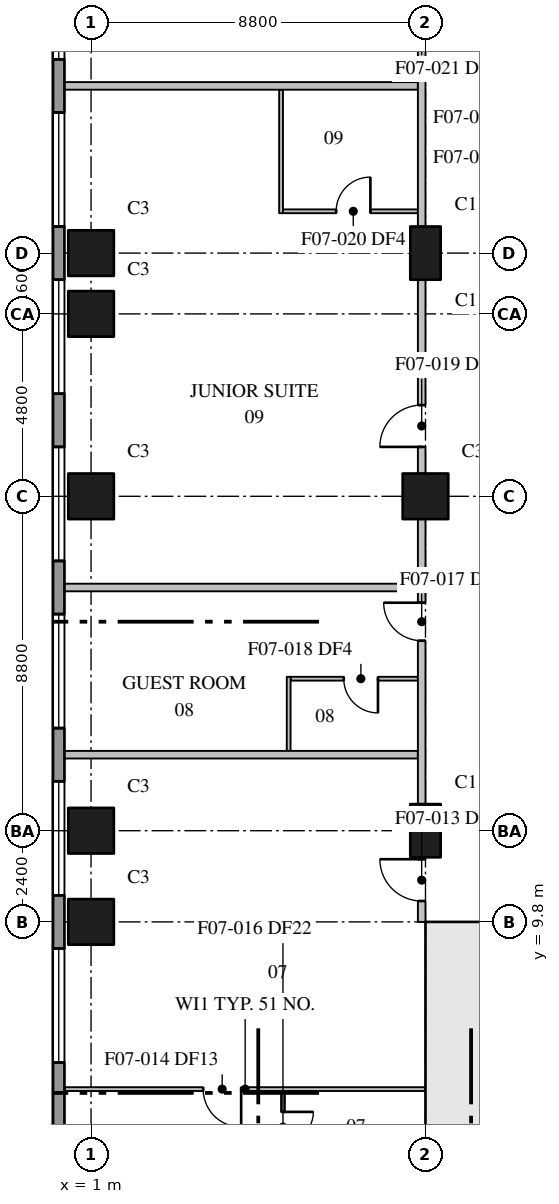
"""IFC4 building model, lengths in metres.
Left out: names, types, materials, properties, quantities, classifications, styles, units other than length and angle.
Written with IfcOpenShell. Run it as: python <this file> out.ifc"""

import sys

from ifc_helpers import new_model, si_unit, direction, frame, frame_2d, origin, origin_2d, place, context, subcontext, project, spatial, rectangle, extrude, element, fill, save


model = new_model("IFC4")
c1 = context("Model", 3, precision=1e-05, world=origin(), true_north=direction((0.0, 1.0)))
c2 = subcontext(c1, "Body", "Model", "MODEL_VIEW")
j1 = project(units=[si_unit("LENGTHUNIT", "METRE"), si_unit("PLANEANGLEUNIT", "RADIAN")], contexts=[c1])
p1 = place(None, origin())
s1 = spatial("IfcSite", under=j1, at=p1, CompositionType="ELEMENT")
p2 = place(p1, origin())
s2 = spatial("IfcBuilding", under=s1, at=p2, CompositionType="ELEMENT")
p3 = place(p2, frame((0.0, 0.0, 87.1)))
s3 = spatial("IfcBuildingStorey", under=s2, at=p3, CompositionType="ELEMENT", Elevation=87.1)
for number, where, z_axis, x_axis in (
    (1, (1.0, 9.8, 0.0), (0.0, 0.0, 1.0), (1.0, 0.0, 0.0)),
    (2, (1.0, 12.2, 0.0), (0.0, 0.0, 1.0), (1.0, 0.0, 0.0)),
    (3, (1.0, 21.0, 0.0), (0.0, 0.0, 1.0), (1.0, 0.0, 0.0)),
    (4, (1.0, 25.8, 0.0), (0.0, 0.0, 1.0), (1.0, 0.0, 0.0)),
    (5, (1.0, 27.4, 0.0), (0.0, 0.0, 1.0), (1.0, 0.0, 0.0)),
):
    element("IfcColumn", number, at=place(p3, frame(where, z_axis=z_axis, x_axis=x_axis)), inside=s3, PredefinedType="COLUMN", context=c2, shape_type="SweptSolid", body=[
        extrude(rectangle(XDim=1.2, YDim=1.2, at=origin_2d()), origin(), (0.0, 0.0, 1.0), 3.7),
    ])
p4 = place(p3, frame((9.8, 12.2, 0.0), z_axis=(0.0, 0.0, 1.0), x_axis=(0.0, 1.0, 0.0)))
e6 = element("IfcColumn", 6, at=p4, inside=s3, PredefinedType="COLUMN", context=c2, shape_type="SweptSolid", body=[
    extrude(rectangle(XDim=1.4, YDim=0.8, at=origin_2d()), origin(), (0.0, 0.0, 1.0), 3.7),
])
p5 = place(p3, frame((9.8, 21.0, 0.0), z_axis=(0.0, 0.0, 1.0), x_axis=(1.0, 0.0, 0.0)))
e7 = element("IfcColumn", 7, at=p5, inside=s3, PredefinedType="COLUMN", context=c2, shape_type="SweptSolid", body=[
    extrude(rectangle(XDim=1.2, YDim=1.2, at=origin_2d()), origin(), (0.0, 0.0, 1.0), 3.7),
])
p6 = place(p3, frame((9.8, 27.4, 0.0), z_axis=(0.0, 0.0, 1.0), x_axis=(0.0, 1.0, 0.0)))
e8 = element("IfcColumn", 8, at=p6, inside=s3, PredefinedType="COLUMN", context=c2, shape_type="SweptSolid", body=[
    extrude(rectangle(XDim=1.4, YDim=0.8, at=origin_2d()), origin(), (0.0, 0.0, 1.0), 3.7),
])
p7 = place(p3, frame((10.6, 1.2, 0.0), z_axis=(0.0, 0.0, 1.0), x_axis=(0.0, 1.0, 0.0)))
e9 = element("IfcWall", 9, at=p7, inside=s3, PredefinedType="SHEAR", context=c2, shape_type="SweptSolid", body=[
    extrude(rectangle(XDim=8.6, YDim=0.8, at=frame_2d((4.3, 0.0))), origin(), (0.0, 0.0, 1.0), 3.7),
])
p8 = place(p3, frame((9.8, 9.6, 0.0), z_axis=(0.0, 0.0, 1.0), x_axis=(1.0, 0.0, 0.0)))
e10 = element("IfcWall", 10, at=p8, inside=s3, PredefinedType="SHEAR", context=c2, shape_type="SweptSolid", body=[
    extrude(rectangle(XDim=4.3, YDim=0.4, at=frame_2d((2.15, 0.0))), origin(), (0.0, 0.0, 1.0), 3.7),
])
p9 = place(p8, frame((2.05, 0.0, 0.0)))
e11 = element("IfcOpeningElement", 11, at=p9, cuts=e10, PredefinedType="OPENING", context=c2, shape_type="SweptSolid", body=[
    extrude(rectangle(XDim=1.2, YDim=2.1, at=frame_2d((0.6, 1.05))), frame((0.0, 0.21, 0.0), z_axis=(0.0, -1.0, 0.0), x_axis=(1.0, 0.0, 0.0)), (0.0, 0.0, 1.0), 0.42),
])
p10 = place(p3, frame((0.15, 78.7, 0.0), z_axis=(0.0, 0.0, 1.0), x_axis=(0.0, -1.0, 0.0)))
e12 = element("IfcWall", 12, at=p10, inside=s3, PredefinedType="STANDARD", context=c2, shape_type="SweptSolid", body=[
    extrude(rectangle(XDim=76.5, YDim=0.3, at=frame_2d((38.25, 0.0))), origin(), (0.0, 0.0, 1.0), 3.4),
])
p11 = place(p10, frame((3.6, 0.0, 0.75)))
e13 = element("IfcOpeningElement", 13, at=p11, cuts=e12, PredefinedType="OPENING", context=c2, shape_type="SweptSolid", body=[
    extrude(rectangle(XDim=3.0, YDim=2.3, at=frame_2d((1.5, 1.15))), frame((0.0, 0.16, 0.0), z_axis=(0.0, -1.0, 0.0), x_axis=(1.0, 0.0, 0.0)), (0.0, 0.0, 1.0), 0.32),
])
p12 = place(p10, frame((8.0, 0.0, 0.75)))
e14 = element("IfcOpeningElement", 14, at=p12, cuts=e12, PredefinedType="OPENING", context=c2, shape_type="SweptSolid", body=[
    extrude(rectangle(XDim=3.0, YDim=2.3, at=frame_2d((1.5, 1.15))), frame((0.0, 0.16, 0.0), z_axis=(0.0, -1.0, 0.0), x_axis=(1.0, 0.0, 0.0)), (0.0, 0.0, 1.0), 0.32),
])
p13 = place(p10, frame((12.4, 0.0, 0.75)))
e15 = element("IfcOpeningElement", 15, at=p13, cuts=e12, PredefinedType="OPENING", context=c2, shape_type="SweptSolid", body=[
    extrude(rectangle(XDim=3.0, YDim=2.3, at=frame_2d((1.5, 1.15))), frame((0.0, 0.16, 0.0), z_axis=(0.0, -1.0, 0.0), x_axis=(1.0, 0.0, 0.0)), (0.0, 0.0, 1.0), 0.32),
])
p14 = place(p10, frame((16.8, 0.0, 0.75)))
e16 = element("IfcOpeningElement", 16, at=p14, cuts=e12, PredefinedType="OPENING", context=c2, shape_type="SweptSolid", body=[
    extrude(rectangle(XDim=3.0, YDim=2.3, at=frame_2d((1.5, 1.15))), frame((0.0, 0.16, 0.0), z_axis=(0.0, -1.0, 0.0), x_axis=(1.0, 0.0, 0.0)), (0.0, 0.0, 1.0), 0.32),
])
p15 = place(p10, frame((21.2, 0.0, 0.75)))
e17 = element("IfcOpeningElement", 17, at=p15, cuts=e12, PredefinedType="OPENING", context=c2, shape_type="SweptSolid", body=[
    extrude(rectangle(XDim=3.0, YDim=2.3, at=frame_2d((1.5, 1.15))), frame((0.0, 0.16, 0.0), z_axis=(0.0, -1.0, 0.0), x_axis=(1.0, 0.0, 0.0)), (0.0, 0.0, 1.0), 0.32),
])
p16 = place(p10, frame((25.6, 0.0, 0.75)))
e18 = element("IfcOpeningElement", 18, at=p16, cuts=e12, PredefinedType="OPENING", context=c2, shape_type="SweptSolid", body=[
    extrude(rectangle(XDim=3.0, YDim=2.3, at=frame_2d((1.5, 1.15))), frame((0.0, 0.16, 0.0), z_axis=(0.0, -1.0, 0.0), x_axis=(1.0, 0.0, 0.0)), (0.0, 0.0, 1.0), 0.32),
])
p17 = place(p10, frame((30.0, 0.0, 0.75)))
e19 = element("IfcOpeningElement", 19, at=p17, cuts=e12, PredefinedType="OPENING", context=c2, shape_type="SweptSolid", body=[
    extrude(rectangle(XDim=3.0, YDim=2.3, at=frame_2d((1.5, 1.15))), frame((0.0, 0.16, 0.0), z_axis=(0.0, -1.0, 0.0), x_axis=(1.0, 0.0, 0.0)), (0.0, 0.0, 1.0), 0.32),
])
p18 = place(p10, frame((34.4, 0.0, 0.75)))
e20 = element("IfcOpeningElement", 20, at=p18, cuts=e12, PredefinedType="OPENING", context=c2, shape_type="SweptSolid", body=[
    extrude(rectangle(XDim=3.0, YDim=2.3, at=frame_2d((1.5, 1.15))), frame((0.0, 0.16, 0.0), z_axis=(0.0, -1.0, 0.0), x_axis=(1.0, 0.0, 0.0)), (0.0, 0.0, 1.0), 0.32),
])
p19 = place(p10, frame((38.8, 0.0, 0.75)))
e21 = element("IfcOpeningElement", 21, at=p19, cuts=e12, PredefinedType="OPENING", context=c2, shape_type="SweptSolid", body=[
    extrude(rectangle(XDim=3.0, YDim=2.3, at=frame_2d((1.5, 1.15))), frame((0.0, 0.16, 0.0), z_axis=(0.0, -1.0, 0.0), x_axis=(1.0, 0.0, 0.0)), (0.0, 0.0, 1.0), 0.32),
])
p20 = place(p10, frame((43.2, 0.0, 0.75)))
e22 = element("IfcOpeningElement", 22, at=p20, cuts=e12, PredefinedType="OPENING", context=c2, shape_type="SweptSolid", body=[
    extrude(rectangle(XDim=3.0, YDim=2.3, at=frame_2d((1.5, 1.15))), frame((0.0, 0.16, 0.0), z_axis=(0.0, -1.0, 0.0), x_axis=(1.0, 0.0, 0.0)), (0.0, 0.0, 1.0), 0.32),
])
p21 = place(p10, frame((47.6, 0.0, 0.75)))
e23 = element("IfcOpeningElement", 23, at=p21, cuts=e12, PredefinedType="OPENING", context=c2, shape_type="SweptSolid", body=[
    extrude(rectangle(XDim=3.0, YDim=2.3, at=frame_2d((1.5, 1.15))), frame((0.0, 0.16, 0.0), z_axis=(0.0, -1.0, 0.0), x_axis=(1.0, 0.0, 0.0)), (0.0, 0.0, 1.0), 0.32),
])
p22 = place(p10, frame((52.0, 0.0, 0.75)))
e24 = element("IfcOpeningElement", 24, at=p22, cuts=e12, PredefinedType="OPENING", context=c2, shape_type="SweptSolid", body=[
    extrude(rectangle(XDim=3.0, YDim=2.3, at=frame_2d((1.5, 1.15))), frame((0.0, 0.16, 0.0), z_axis=(0.0, -1.0, 0.0), x_axis=(1.0, 0.0, 0.0)), (0.0, 0.0, 1.0), 0.32),
])
p23 = place(p10, frame((56.4, 0.0, 0.75)))
e25 = element("IfcOpeningElement", 25, at=p23, cuts=e12, PredefinedType="OPENING", context=c2, shape_type="SweptSolid", body=[
    extrude(rectangle(XDim=3.0, YDim=2.3, at=frame_2d((1.5, 1.15))), frame((0.0, 0.16, 0.0), z_axis=(0.0, -1.0, 0.0), x_axis=(1.0, 0.0, 0.0)), (0.0, 0.0, 1.0), 0.32),
])
p24 = place(p10, frame((60.8, 0.0, 0.75)))
e26 = element("IfcOpeningElement", 26, at=p24, cuts=e12, PredefinedType="OPENING", context=c2, shape_type="SweptSolid", body=[
    extrude(rectangle(XDim=3.0, YDim=2.3, at=frame_2d((1.5, 1.15))), frame((0.0, 0.16, 0.0), z_axis=(0.0, -1.0, 0.0), x_axis=(1.0, 0.0, 0.0)), (0.0, 0.0, 1.0), 0.32),
])
p25 = place(p10, frame((65.2, 0.0, 0.75)))
e27 = element("IfcOpeningElement", 27, at=p25, cuts=e12, PredefinedType="OPENING", context=c2, shape_type="SweptSolid", body=[
    extrude(rectangle(XDim=3.0, YDim=2.3, at=frame_2d((1.5, 1.15))), frame((0.0, 0.16, 0.0), z_axis=(0.0, -1.0, 0.0), x_axis=(1.0, 0.0, 0.0)), (0.0, 0.0, 1.0), 0.32),
])
p26 = place(p10, frame((69.6, 0.0, 0.75)))
e28 = element("IfcOpeningElement", 28, at=p26, cuts=e12, PredefinedType="OPENING", context=c2, shape_type="SweptSolid", body=[
    extrude(rectangle(XDim=3.0, YDim=2.3, at=frame_2d((1.5, 1.15))), frame((0.0, 0.16, 0.0), z_axis=(0.0, -1.0, 0.0), x_axis=(1.0, 0.0, 0.0)), (0.0, 0.0, 1.0), 0.32),
])
p27 = place(p3, frame((9.7, 9.8, 0.0), z_axis=(0.0, 0.0, 1.0), x_axis=(0.0, 1.0, 0.0)))
e29 = element("IfcWall", 29, at=p27, inside=s3, PredefinedType="PARTITIONING", context=c2, shape_type="SweptSolid", body=[
    extrude(rectangle(XDim=1.7, YDim=0.2, at=frame_2d((0.85, 0.0))), origin(), (0.0, 0.0, 1.0), 3.4),
])
p28 = place(p27, frame((0.55, 0.0, 0.0)))
e30 = element("IfcOpeningElement", 30, at=p28, cuts=e29, PredefinedType="OPENING", context=c2, shape_type="SweptSolid", body=[
    extrude(rectangle(XDim=1.1, YDim=2.1, at=frame_2d((0.55, 1.05))), frame((0.0, 0.11, 0.0), z_axis=(0.0, -1.0, 0.0), x_axis=(1.0, 0.0, 0.0)), (0.0, 0.0, 1.0), 0.22),
])
p29 = place(p3, frame((9.7, 12.9, 0.0), z_axis=(0.0, 0.0, 1.0), x_axis=(0.0, 1.0, 0.0)))
e31 = element("IfcWall", 31, at=p29, inside=s3, PredefinedType="PARTITIONING", context=c2, shape_type="SweptSolid", body=[
    extrude(rectangle(XDim=7.5, YDim=0.2, at=frame_2d((3.75, 0.0))), origin(), (0.0, 0.0, 1.0), 3.4),
])
p30 = place(p29, frame((4.3, 0.0, 0.0)))
e32 = element("IfcOpeningElement", 32, at=p30, cuts=e31, PredefinedType="OPENING", context=c2, shape_type="SweptSolid", body=[
    extrude(rectangle(XDim=1.0, YDim=2.1, at=frame_2d((0.5, 1.05))), frame((0.0, 0.11, 0.0), z_axis=(0.0, -1.0, 0.0), x_axis=(1.0, 0.0, 0.0)), (0.0, 0.0, 1.0), 0.22),
])
p31 = place(p3, frame((9.7, 21.6, 0.0), z_axis=(0.0, 0.0, 1.0), x_axis=(0.0, 1.0, 0.0)))
e33 = element("IfcWall", 33, at=p31, inside=s3, PredefinedType="PARTITIONING", context=c2, shape_type="SweptSolid", body=[
    extrude(rectangle(XDim=5.1, YDim=0.2, at=frame_2d((2.55, 0.0))), origin(), (0.0, 0.0, 1.0), 3.4),
])
p32 = place(p31, frame((0.7, 0.0, 0.0)))
e34 = element("IfcOpeningElement", 34, at=p32, cuts=e33, PredefinedType="OPENING", context=c2, shape_type="SweptSolid", body=[
    extrude(rectangle(XDim=1.1, YDim=2.1, at=frame_2d((0.55, 1.05))), frame((0.0, 0.11, 0.0), z_axis=(0.0, -1.0, 0.0), x_axis=(1.0, 0.0, 0.0)), (0.0, 0.0, 1.0), 0.22),
])
p33 = place(p3, frame((9.7, 28.1, 0.0), z_axis=(0.0, 0.0, 1.0), x_axis=(0.0, 1.0, 0.0)))
e35 = element("IfcWall", 35, at=p33, inside=s3, PredefinedType="PARTITIONING", context=c2, shape_type="SweptSolid", body=[
    extrude(rectangle(XDim=7.4, YDim=0.2, at=frame_2d((3.7, 0.0))), origin(), (0.0, 0.0, 1.0), 3.4),
])
p34 = place(p33, frame((5.2, 0.0, 0.0)))
e36 = element("IfcOpeningElement", 36, at=p34, cuts=e35, PredefinedType="OPENING", context=c2, shape_type="SweptSolid", body=[
    extrude(rectangle(XDim=1.1, YDim=2.1, at=frame_2d((0.55, 1.05))), frame((0.0, 0.11, 0.0), z_axis=(0.0, -1.0, 0.0), x_axis=(1.0, 0.0, 0.0)), (0.0, 0.0, 1.0), 0.22),
])
for number, where, z_axis, x_axis in (
    (37, (0.31, 14.2, 0.0), (0.0, 0.0, 1.0), (1.0, 0.0, 0.0)),
    (38, (0.31, 18.6, 0.0), (0.0, 0.0, 1.0), (1.0, 0.0, 0.0)),
    (39, (0.31, 31.8, 0.0), (0.0, 0.0, 1.0), (1.0, 0.0, 0.0)),
):
    element("IfcWall", number, at=place(p3, frame(where, z_axis=z_axis, x_axis=x_axis)), inside=s3, PredefinedType="PARTITIONING", context=c2, shape_type="SweptSolid", body=[
        extrude(rectangle(XDim=9.29, YDim=0.2, at=frame_2d((4.645, 0.0))), origin(), (0.0, 0.0, 1.0), 3.4),
    ])
p35 = place(p3, frame((9.6, 16.2, 0.0), z_axis=(0.0, 0.0, 1.0), x_axis=(-1.0, 0.0, 0.0)))
e40 = element("IfcWall", 40, at=p35, inside=s3, PredefinedType="PARTITIONING", context=c2, shape_type="SweptSolid", body=[
    extrude(rectangle(XDim=3.35, YDim=0.1, at=frame_2d((1.675, 0.0))), origin(), (0.0, 0.0, 1.0), 3.4),
])
p36 = place(p35, frame((1.05, 0.0, 0.0)))
e41 = element("IfcOpeningElement", 41, at=p36, cuts=e40, PredefinedType="OPENING", context=c2, shape_type="SweptSolid", body=[
    extrude(rectangle(XDim=0.9, YDim=2.1, at=frame_2d((0.45, 1.05))), frame((0.0, 0.06, 0.0), z_axis=(0.0, -1.0, 0.0), x_axis=(1.0, 0.0, 0.0)), (0.0, 0.0, 1.0), 0.12),
])
p37 = place(p3, frame((6.05, 5.35, 0.0), z_axis=(0.0, 0.0, 1.0), x_axis=(0.0, -1.0, 0.0)))
e42 = element("IfcWall", 42, at=p37, inside=s3, PredefinedType="PARTITIONING", context=c2, shape_type="SweptSolid", body=[
    extrude(rectangle(XDim=4.4, YDim=0.1, at=frame_2d((2.2, 0.0))), origin(), (0.0, 0.0, 1.0), 3.4),
])
p38 = place(p37, frame((2.7, 0.0, 0.0)))
e43 = element("IfcOpeningElement", 43, at=p38, cuts=e42, PredefinedType="OPENING", context=c2, shape_type="SweptSolid", body=[
    extrude(rectangle(XDim=0.9, YDim=2.1, at=frame_2d((0.45, 1.05))), frame((0.0, 0.06, 0.0), z_axis=(0.0, -1.0, 0.0), x_axis=(1.0, 0.0, 0.0)), (0.0, 0.0, 1.0), 0.12),
])
p39 = place(p37, frame((0.55, 0.0, 0.0)))
e44 = element("IfcOpeningElement", 44, at=p39, cuts=e42, PredefinedType="OPENING", context=c2, shape_type="SweptSolid", body=[
    extrude(rectangle(XDim=0.8, YDim=2.1, at=frame_2d((0.4, 1.05))), frame((0.0, 0.06, 0.0), z_axis=(0.0, -1.0, 0.0), x_axis=(1.0, 0.0, 0.0)), (0.0, 0.0, 1.0), 0.12),
])
p40 = place(p3, frame((9.8, 5.4, 0.0), z_axis=(0.0, 0.0, 1.0), x_axis=(-1.0, 0.0, 0.0)))
e45 = element("IfcWall", 45, at=p40, inside=s3, PredefinedType="PARTITIONING", context=c2, shape_type="SweptSolid", body=[
    extrude(rectangle(XDim=9.49, YDim=0.1, at=frame_2d((4.745, 0.0))), origin(), (0.0, 0.0, 1.0), 3.4),
])
p41 = place(p40, frame((4.85, 0.0, 0.0)))
e46 = element("IfcOpeningElement", 46, at=p41, cuts=e45, PredefinedType="OPENING", context=c2, shape_type="SweptSolid", body=[
    extrude(rectangle(XDim=1.0, YDim=2.1, at=frame_2d((0.5, 1.05))), frame((0.0, 0.06, 0.0), z_axis=(0.0, -1.0, 0.0), x_axis=(1.0, 0.0, 0.0)), (0.0, 0.0, 1.0), 0.12),
])
p42 = place(p3, frame((6.2, 14.3, 0.0), z_axis=(0.0, 0.0, 1.0), x_axis=(0.0, 1.0, 0.0)))
e47 = element("IfcWall", 47, at=p42, inside=s3, PredefinedType="PARTITIONING", context=c2, shape_type="SweptSolid", body=[
    extrude(rectangle(XDim=1.95, YDim=0.1, at=frame_2d((0.975, 0.0))), origin(), (0.0, 0.0, 1.0), 3.4),
])
p43 = place(p3, frame((6.0, 28.45, 0.0), z_axis=(0.0, 0.0, 1.0), x_axis=(0.0, 1.0, 0.0)))
e48 = element("IfcWall", 48, at=p43, inside=s3, PredefinedType="PARTITIONING", context=c2, shape_type="SweptSolid", body=[
    extrude(rectangle(XDim=3.25, YDim=0.1, at=frame_2d((1.625, 0.0))), origin(), (0.0, 0.0, 1.0), 3.4),
])
p44 = place(p3, frame((6.05, 28.5, 0.0), z_axis=(0.0, 0.0, 1.0), x_axis=(1.0, 0.0, 0.0)))
e49 = element("IfcWall", 49, at=p44, inside=s3, PredefinedType="PARTITIONING", context=c2, shape_type="SweptSolid", body=[
    extrude(rectangle(XDim=3.55, YDim=0.1, at=frame_2d((1.775, 0.0))), origin(), (0.0, 0.0, 1.0), 3.4),
])
p45 = place(p44, frame((1.4, 0.0, 0.0)))
e50 = element("IfcOpeningElement", 50, at=p45, cuts=e49, PredefinedType="OPENING", context=c2, shape_type="SweptSolid", body=[
    extrude(rectangle(XDim=0.9, YDim=2.1, at=frame_2d((0.45, 1.05))), frame((0.0, 0.06, 0.0), z_axis=(0.0, -1.0, 0.0), x_axis=(1.0, 0.0, 0.0)), (0.0, 0.0, 1.0), 0.12),
])
p46 = place(p20, origin())
e51 = element("IfcWindow", 51, at=p46, inside=s3, PartitioningType="SINGLE_PANEL", PredefinedType="WINDOW", context=c2, shape_type="SweptSolid", body=[
    extrude(rectangle(XDim=3.0, YDim=2.3, at=frame_2d((1.5, 1.15))), frame((0.0, 0.03, 0.0), z_axis=(0.0, -1.0, 0.0), x_axis=(1.0, 0.0, 0.0)), (0.0, 0.0, 1.0), 0.06),
])
fill(e22, e51)
p47 = place(p21, origin())
e52 = element("IfcWindow", 52, at=p47, inside=s3, PartitioningType="SINGLE_PANEL", PredefinedType="WINDOW", context=c2, shape_type="SweptSolid", body=[
    extrude(rectangle(XDim=3.0, YDim=2.3, at=frame_2d((1.5, 1.15))), frame((0.0, 0.03, 0.0), z_axis=(0.0, -1.0, 0.0), x_axis=(1.0, 0.0, 0.0)), (0.0, 0.0, 1.0), 0.06),
])
fill(e23, e52)
p48 = place(p22, origin())
e53 = element("IfcWindow", 53, at=p48, inside=s3, PartitioningType="SINGLE_PANEL", PredefinedType="WINDOW", context=c2, shape_type="SweptSolid", body=[
    extrude(rectangle(XDim=3.0, YDim=2.3, at=frame_2d((1.5, 1.15))), frame((0.0, 0.03, 0.0), z_axis=(0.0, -1.0, 0.0), x_axis=(1.0, 0.0, 0.0)), (0.0, 0.0, 1.0), 0.06),
])
fill(e24, e53)
p49 = place(p23, origin())
e54 = element("IfcWindow", 54, at=p49, inside=s3, PartitioningType="SINGLE_PANEL", PredefinedType="WINDOW", context=c2, shape_type="SweptSolid", body=[
    extrude(rectangle(XDim=3.0, YDim=2.3, at=frame_2d((1.5, 1.15))), frame((0.0, 0.03, 0.0), z_axis=(0.0, -1.0, 0.0), x_axis=(1.0, 0.0, 0.0)), (0.0, 0.0, 1.0), 0.06),
])
fill(e25, e54)
p50 = place(p24, origin())
e55 = element("IfcWindow", 55, at=p50, inside=s3, PartitioningType="SINGLE_PANEL", PredefinedType="WINDOW", context=c2, shape_type="SweptSolid", body=[
    extrude(rectangle(XDim=3.0, YDim=2.3, at=frame_2d((1.5, 1.15))), frame((0.0, 0.03, 0.0), z_axis=(0.0, -1.0, 0.0), x_axis=(1.0, 0.0, 0.0)), (0.0, 0.0, 1.0), 0.06),
])
fill(e26, e55)
p51 = place(p25, origin())
e56 = element("IfcWindow", 56, at=p51, inside=s3, PartitioningType="SINGLE_PANEL", PredefinedType="WINDOW", context=c2, shape_type="SweptSolid", body=[
    extrude(rectangle(XDim=3.0, YDim=2.3, at=frame_2d((1.5, 1.15))), frame((0.0, 0.03, 0.0), z_axis=(0.0, -1.0, 0.0), x_axis=(1.0, 0.0, 0.0)), (0.0, 0.0, 1.0), 0.06),
])
fill(e27, e56)
p52 = place(p26, origin())
e57 = element("IfcWindow", 57, at=p52, inside=s3, PartitioningType="SINGLE_PANEL", PredefinedType="WINDOW", context=c2, shape_type="SweptSolid", body=[
    extrude(rectangle(XDim=3.0, YDim=2.3, at=frame_2d((1.5, 1.15))), frame((0.0, 0.03, 0.0), z_axis=(0.0, -1.0, 0.0), x_axis=(1.0, 0.0, 0.0)), (0.0, 0.0, 1.0), 0.06),
])
fill(e28, e57)
p53 = place(p28, origin())
e58 = element("IfcDoor", 58, at=p53, inside=s3, OperationType="SINGLE_SWING_RIGHT", PredefinedType="DOOR", context=c2, shape_type="SweptSolid", body=[
    extrude(rectangle(XDim=1.1, YDim=2.1, at=frame_2d((0.55, 1.05))), frame((0.0, 0.025, 0.0), z_axis=(0.0, -1.0, 0.0), x_axis=(1.0, 0.0, 0.0)), (0.0, 0.0, 1.0), 0.05),
])
fill(e30, e58)
p54 = place(p41, origin())
e59 = element("IfcDoor", 59, at=p54, inside=s3, OperationType="SINGLE_SWING_LEFT", PredefinedType="DOOR", context=c2, shape_type="SweptSolid", body=[
    extrude(rectangle(XDim=1.0, YDim=2.1, at=frame_2d((0.5, 1.05))), frame((0.0, 0.025, 0.0), z_axis=(0.0, -1.0, 0.0), x_axis=(1.0, 0.0, 0.0)), (0.0, 0.0, 1.0), 0.05),
])
fill(e46, e59)
p55 = place(p39, origin())
e60 = element("IfcDoor", 60, at=p55, inside=s3, OperationType="SINGLE_SWING_LEFT", PredefinedType="DOOR", context=c2, shape_type="SweptSolid", body=[
    extrude(rectangle(XDim=0.8, YDim=2.1, at=frame_2d((0.4, 1.05))), frame((0.0, 0.025, 0.0), z_axis=(0.0, -1.0, 0.0), x_axis=(1.0, 0.0, 0.0)), (0.0, 0.0, 1.0), 0.05),
])
fill(e44, e60)
p56 = place(p30, origin())
e61 = element("IfcDoor", 61, at=p56, inside=s3, OperationType="SINGLE_SWING_RIGHT", PredefinedType="DOOR", context=c2, shape_type="SweptSolid", body=[
    extrude(rectangle(XDim=1.0, YDim=2.1, at=frame_2d((0.5, 1.05))), frame((0.0, 0.025, 0.0), z_axis=(0.0, -1.0, 0.0), x_axis=(1.0, 0.0, 0.0)), (0.0, 0.0, 1.0), 0.05),
])
fill(e32, e61)
p57 = place(p36, origin())
e62 = element("IfcDoor", 62, at=p57, inside=s3, OperationType="SINGLE_SWING_LEFT", PredefinedType="DOOR", context=c2, shape_type="SweptSolid", body=[
    extrude(rectangle(XDim=0.9, YDim=2.1, at=frame_2d((0.45, 1.05))), frame((0.0, 0.025, 0.0), z_axis=(0.0, -1.0, 0.0), x_axis=(1.0, 0.0, 0.0)), (0.0, 0.0, 1.0), 0.05),
])
fill(e41, e62)
p58 = place(p32, origin())
e63 = element("IfcDoor", 63, at=p58, inside=s3, OperationType="SINGLE_SWING_LEFT", PredefinedType="DOOR", context=c2, shape_type="SweptSolid", body=[
    extrude(rectangle(XDim=1.1, YDim=2.1, at=frame_2d((0.55, 1.05))), frame((0.0, 0.025, 0.0), z_axis=(0.0, -1.0, 0.0), x_axis=(1.0, 0.0, 0.0)), (0.0, 0.0, 1.0), 0.05),
])
fill(e34, e63)
p59 = place(p45, origin())
e64 = element("IfcDoor", 64, at=p59, inside=s3, OperationType="SINGLE_SWING_RIGHT", PredefinedType="DOOR", context=c2, shape_type="SweptSolid", body=[
    extrude(rectangle(XDim=0.9, YDim=2.1, at=frame_2d((0.45, 1.05))), frame((0.0, 0.025, 0.0), z_axis=(0.0, -1.0, 0.0), x_axis=(1.0, 0.0, 0.0)), (0.0, 0.0, 1.0), 0.05),
])
fill(e50, e64)
save(model, sys.argv[1])
